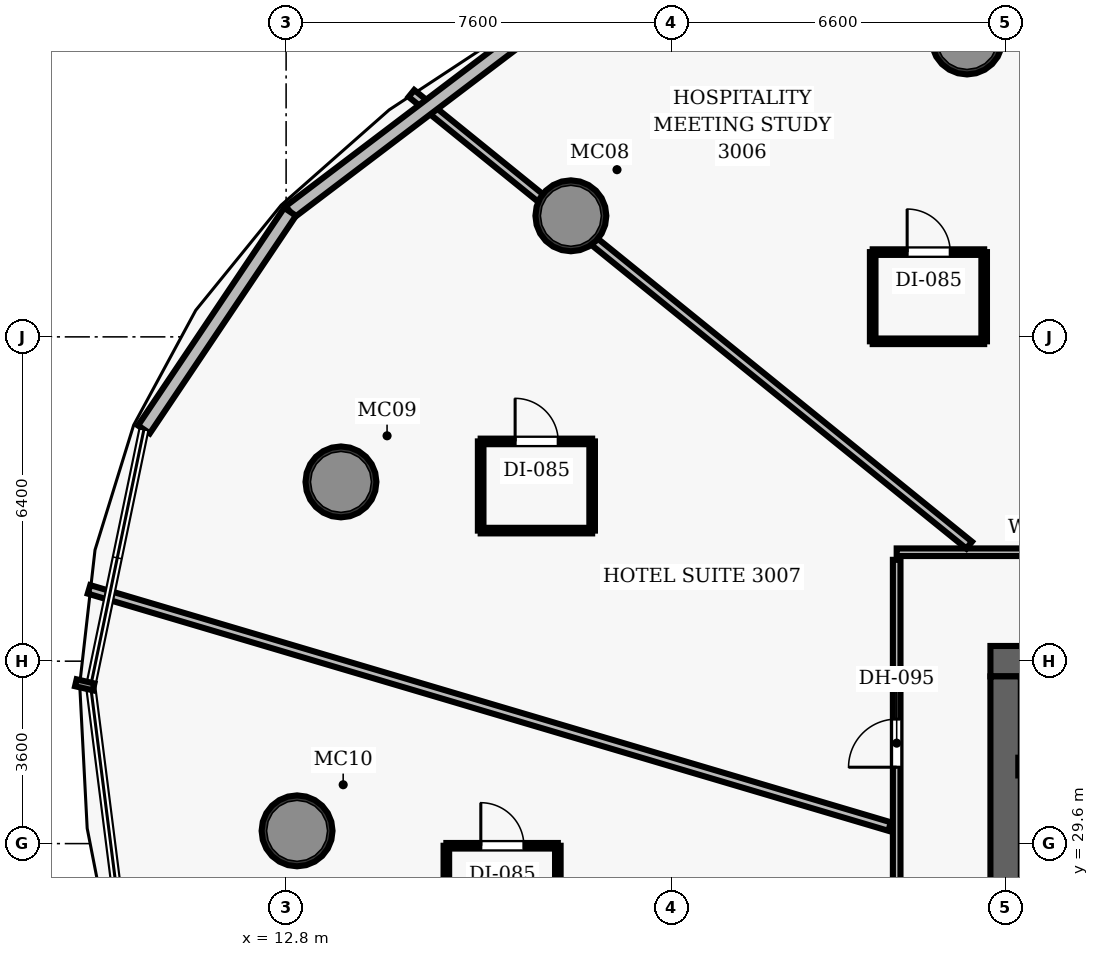
"""IFC4 building model, lengths in metres.
Left out: names, types, materials, properties, quantities, classifications, styles, units other than length and angle.
Written with IfcOpenShell. Run it as: python <this file> out.ifc"""

import sys

from ifc_helpers import new_model, si_unit, direction, frame, frame_2d, origin, origin_2d, place, context, subcontext, project, spatial, rectangle, hollow_circle, extrude, element, fill, save


model = new_model("IFC4")
c1 = context("Model", 3, precision=1e-05, world=origin(), true_north=direction((0.0, 1.0)))
c2 = subcontext(c1, "Body", "Model", "MODEL_VIEW")
j1 = project(units=[si_unit("LENGTHUNIT", "METRE"), si_unit("PLANEANGLEUNIT", "RADIAN")], contexts=[c1])
p1 = place(None, origin())
s1 = spatial("IfcSite", under=j1, at=p1, CompositionType="ELEMENT")
p2 = place(p1, origin())
s2 = spatial("IfcBuilding", under=s1, at=p2, CompositionType="ELEMENT")
p3 = place(p2, frame((0.0, 0.0, 123.8)))
s3 = spatial("IfcBuildingStorey", under=s2, at=p3, CompositionType="ELEMENT", Elevation=123.8)
p4 = place(p3, frame((26.7, 33.2, 0.0), z_axis=(0.0, 0.0, 1.0), x_axis=(1.0, 0.0, 0.0)))
e1 = element("IfcWall", 1, at=p4, inside=s3, PredefinedType="SHEAR", context=c2, shape_type="SweptSolid", body=[
    extrude(rectangle(XDim=22.6, YDim=0.6, at=frame_2d((11.3, 0.0))), origin(), (0.0, 0.0, 1.0), 3.5),
])
p5 = place(p4, frame((4.62, 0.0, 0.0)))
e2 = element("IfcOpeningElement", 2, at=p5, cuts=e1, PredefinedType="OPENING", context=c2, shape_type="SweptSolid", body=[
    extrude(rectangle(XDim=1.05, YDim=2.15, at=frame_2d((0.525, 1.075))), frame((0.0, 0.31, 0.0), z_axis=(0.0, -1.0, 0.0), x_axis=(1.0, 0.0, 0.0)), (0.0, 0.0, 1.0), 0.62),
])
p6 = place(p4, frame((14.52, 0.0, 0.0)))
e3 = element("IfcOpeningElement", 3, at=p6, cuts=e1, PredefinedType="OPENING", context=c2, shape_type="SweptSolid", body=[
    extrude(rectangle(XDim=1.05, YDim=2.15, at=frame_2d((0.525, 1.075))), frame((0.0, 0.31, 0.0), z_axis=(0.0, -1.0, 0.0), x_axis=(1.0, 0.0, 0.0)), (0.0, 0.0, 1.0), 0.62),
])
p7 = place(p3, frame((27.0, 19.1, 0.0), z_axis=(0.0, 0.0, 1.0), x_axis=(0.0, 1.0, 0.0)))
e4 = element("IfcWall", 4, at=p7, inside=s3, PredefinedType="SHEAR", context=c2, shape_type="SweptSolid", body=[
    extrude(rectangle(XDim=13.8, YDim=0.6, at=frame_2d((6.9, 0.0))), origin(), (0.0, 0.0, 1.0), 3.5),
])
p8 = place(p7, frame((8.2, 0.0, 0.0)))
e5 = element("IfcOpeningElement", 5, at=p8, cuts=e4, PredefinedType="OPENING", context=c2, shape_type="SweptSolid", body=[
    extrude(rectangle(XDim=1.05, YDim=2.15, at=frame_2d((0.525, 1.075))), frame((0.0, 0.31, 0.0), z_axis=(0.0, -1.0, 0.0), x_axis=(1.0, 0.0, 0.0)), (0.0, 0.0, 1.0), 0.62),
])
for number, where, z_axis, x_axis in (
    (6, (26.238, 45.479, 0.0), (0.0, 0.0, 1.0), (1.0, 0.0, 0.0)),
    (7, (18.42, 41.989, 0.0), (0.0, 0.0, 1.0), (1.0, 0.0, 0.0)),
    (8, (13.882, 36.738, 0.0), (0.0, 0.0, 1.0), (1.0, 0.0, 0.0)),
    (9, (13.016, 29.852, 0.0), (0.0, 0.0, 1.0), (1.0, 0.0, 0.0)),
):
    element("IfcColumn", number, at=place(p3, frame(where, z_axis=z_axis, x_axis=x_axis)), inside=s3, PredefinedType="COLUMN", context=c2, shape_type="SweptSolid", body=[
        extrude(hollow_circle(Radius=0.7, WallThickness=0.055, at=origin_2d()), origin(), (0.0, 0.0, 1.0), 3.5),
    ])
p9 = place(p3, frame((27.25, 31.12, 0.0), z_axis=(0.0, 0.0, 1.0), x_axis=(1.0, 0.0, 0.0)))
e10 = element("IfcWall", 10, at=p9, inside=s3, PredefinedType="SHEAR", context=c2, shape_type="SweptSolid", body=[
    extrude(rectangle(XDim=3.67, YDim=0.35, at=frame_2d((1.835, 0.0))), origin(), (0.0, 0.0, 1.0), 2.675),
])
p10 = place(p9, frame((1.25, 0.0, 0.0)))
e11 = element("IfcOpeningElement", 11, at=p10, cuts=e10, PredefinedType="OPENING", context=c2, shape_type="SweptSolid", body=[
    extrude(rectangle(XDim=1.1, YDim=2.15, at=frame_2d((0.55, 1.075))), frame((0.0, 0.185, 0.0), z_axis=(0.0, -1.0, 0.0), x_axis=(1.0, 0.0, 0.0)), (0.0, 0.0, 1.0), 0.37),
])
p11 = place(p3, frame((24.85, 35.35, 0.0), z_axis=(0.0, 0.0, 1.0), x_axis=(1.0, 0.0, 0.0)))
e12 = element("IfcWall", 12, at=p11, inside=s3, PredefinedType="PARTITIONING", context=c2, shape_type="SweptSolid", body=[
    extrude(rectangle(XDim=26.0, YDim=0.15, at=frame_2d((13.0, 0.0))), origin(), (0.0, 0.0, 1.0), 2.675),
])
p12 = place(p11, frame((21.964, 0.0, 0.0)))
e13 = element("IfcOpeningElement", 13, at=p12, cuts=e12, PredefinedType="OPENING", context=c2, shape_type="SweptSolid", body=[
    extrude(rectangle(XDim=0.95, YDim=2.15, at=frame_2d((0.475, 1.075))), frame((0.0, 0.085, 0.0), z_axis=(0.0, -1.0, 0.0), x_axis=(1.0, 0.0, 0.0)), (0.0, 0.0, 1.0), 0.17),
])
p13 = place(p11, frame((16.552, 0.0, 0.0)))
e14 = element("IfcOpeningElement", 14, at=p13, cuts=e12, PredefinedType="OPENING", context=c2, shape_type="SweptSolid", body=[
    extrude(rectangle(XDim=0.95, YDim=2.15, at=frame_2d((0.475, 1.075))), frame((0.0, 0.085, 0.0), z_axis=(0.0, -1.0, 0.0), x_axis=(1.0, 0.0, 0.0)), (0.0, 0.0, 1.0), 0.17),
])
p14 = place(p11, frame((12.921, 0.0, 0.0)))
e15 = element("IfcOpeningElement", 15, at=p14, cuts=e12, PredefinedType="OPENING", context=c2, shape_type="SweptSolid", body=[
    extrude(rectangle(XDim=0.95, YDim=2.15, at=frame_2d((0.475, 1.075))), frame((0.0, 0.085, 0.0), z_axis=(0.0, -1.0, 0.0), x_axis=(1.0, 0.0, 0.0)), (0.0, 0.0, 1.0), 0.17),
])
p15 = place(p11, frame((8.894, 0.0, 0.0)))
e16 = element("IfcOpeningElement", 16, at=p15, cuts=e12, PredefinedType="OPENING", context=c2, shape_type="SweptSolid", body=[
    extrude(rectangle(XDim=0.95, YDim=2.15, at=frame_2d((0.475, 1.075))), frame((0.0, 0.085, 0.0), z_axis=(0.0, -1.0, 0.0), x_axis=(1.0, 0.0, 0.0)), (0.0, 0.0, 1.0), 0.17),
])
p16 = place(p11, frame((6.027, 0.0, 0.0)))
e17 = element("IfcOpeningElement", 17, at=p16, cuts=e12, PredefinedType="OPENING", context=c2, shape_type="SweptSolid", body=[
    extrude(rectangle(XDim=0.95, YDim=2.15, at=frame_2d((0.475, 1.075))), frame((0.0, 0.085, 0.0), z_axis=(0.0, -1.0, 0.0), x_axis=(1.0, 0.0, 0.0)), (0.0, 0.0, 1.0), 0.17),
])
p17 = place(p3, frame((24.85, 27.08, 0.0), z_axis=(0.0, 0.0, 1.0), x_axis=(0.0, 1.0, 0.0)))
e18 = element("IfcWall", 18, at=p17, inside=s3, PredefinedType="PARTITIONING", context=c2, shape_type="SweptSolid", body=[
    extrude(rectangle(XDim=8.12, YDim=0.15, at=frame_2d((4.06, 0.0))), origin(), (0.0, 0.0, 1.0), 2.675),
])
p18 = place(p17, frame((4.027, 0.0, 0.0)))
e19 = element("IfcOpeningElement", 19, at=p18, cuts=e18, PredefinedType="OPENING", context=c2, shape_type="SweptSolid", body=[
    extrude(rectangle(XDim=0.95, YDim=2.15, at=frame_2d((0.475, 1.075))), frame((0.0, 0.085, 0.0), z_axis=(0.0, -1.0, 0.0), x_axis=(1.0, 0.0, 0.0)), (0.0, 0.0, 1.0), 0.17),
])
p19 = place(p3, frame((32.847, 35.49, 0.0), z_axis=(0.0, 0.0, 1.0), x_axis=(-0.477169302066, 0.878811388846, 0.0)))
e20 = element("IfcWall", 20, at=p19, inside=s3, PredefinedType="PARTITIONING", context=c2, shape_type="SweptSolid", body=[
    extrude(rectangle(XDim=15.306, YDim=0.175, at=frame_2d((7.653, 0.0))), origin(), (0.0, 0.0, 1.0), 2.675),
])
p20 = place(p3, frame((26.281, 35.49, 0.0), z_axis=(0.0, 0.0, 1.0), x_axis=(-0.777136881542, 0.629331603646, 0.0)))
e21 = element("IfcWall", 21, at=p20, inside=s3, PredefinedType="PARTITIONING", context=c2, shape_type="SweptSolid", body=[
    extrude(rectangle(XDim=14.164, YDim=0.175, at=frame_2d((7.082, 0.0))), origin(), (0.0, 0.0, 1.0), 2.675),
])
p21 = place(p3, frame((24.71, 29.937, 0.0), z_axis=(0.0, 0.0, 1.0), x_axis=(-0.958822771046, 0.284005094539, 0.0)))
e22 = element("IfcWall", 22, at=p21, inside=s3, PredefinedType="PARTITIONING", context=c2, shape_type="SweptSolid", body=[
    extrude(rectangle(XDim=16.478, YDim=0.175, at=frame_2d((8.239, 0.0))), origin(), (0.0, 0.0, 1.0), 2.675),
])
p22 = place(p3, frame((24.377, 39.513, 0.0), z_axis=(0.0, 0.0, 1.0), x_axis=(1.0, 0.0, 0.0)))
e23 = element("IfcWall", 23, at=p22, inside=s3, PredefinedType="PARTITIONING", context=c2, shape_type="SweptSolid", body=[
    extrude(rectangle(XDim=2.2, YDim=0.11, at=frame_2d((1.1, 0.0))), origin(), (0.0, 0.0, 1.0), 2.675),
])
p23 = place(p3, frame((24.377, 41.273, 0.0), z_axis=(0.0, 0.0, 1.0), x_axis=(1.0, 0.0, 0.0)))
e24 = element("IfcWall", 24, at=p23, inside=s3, PredefinedType="PARTITIONING", context=c2, shape_type="SweptSolid", body=[
    extrude(rectangle(XDim=2.2, YDim=0.11, at=frame_2d((1.1, 0.0))), origin(), (0.0, 0.0, 1.0), 2.675),
])
p24 = place(p23, frame((0.68, 0.0, 0.0)))
e25 = element("IfcOpeningElement", 25, at=p24, cuts=e24, PredefinedType="OPENING", context=c2, shape_type="SweptSolid", body=[
    extrude(rectangle(XDim=0.85, YDim=2.1, at=frame_2d((0.425, 1.05))), frame((0.0, 0.065, 0.0), z_axis=(0.0, -1.0, 0.0), x_axis=(1.0, 0.0, 0.0)), (0.0, 0.0, 1.0), 0.13),
])
for number, where, z_axis, x_axis in (
    (26, (24.377, 39.513, 0.0), (0.0, 0.0, 1.0), (0.0, 1.0, 0.0)),
    (27, (26.577, 39.513, 0.0), (0.0, 0.0, 1.0), (0.0, 1.0, 0.0)),
):
    element("IfcWall", number, at=place(p3, frame(where, z_axis=z_axis, x_axis=x_axis)), inside=s3, PredefinedType="PARTITIONING", context=c2, shape_type="SweptSolid", body=[
        extrude(rectangle(XDim=1.76, YDim=0.11, at=frame_2d((0.88, 0.0))), origin(), (0.0, 0.0, 1.0), 2.675),
    ])
p25 = place(p3, frame((16.64, 35.777, 0.0), z_axis=(0.0, 0.0, 1.0), x_axis=(1.0, 0.0, 0.0)))
e28 = element("IfcWall", 28, at=p25, inside=s3, PredefinedType="PARTITIONING", context=c2, shape_type="SweptSolid", body=[
    extrude(rectangle(XDim=2.2, YDim=0.11, at=frame_2d((1.1, 0.0))), origin(), (0.0, 0.0, 1.0), 2.675),
])
p26 = place(p3, frame((16.64, 37.537, 0.0), z_axis=(0.0, 0.0, 1.0), x_axis=(1.0, 0.0, 0.0)))
e29 = element("IfcWall", 29, at=p26, inside=s3, PredefinedType="PARTITIONING", context=c2, shape_type="SweptSolid", body=[
    extrude(rectangle(XDim=2.2, YDim=0.11, at=frame_2d((1.1, 0.0))), origin(), (0.0, 0.0, 1.0), 2.675),
])
p27 = place(p26, frame((0.68, 0.0, 0.0)))
e30 = element("IfcOpeningElement", 30, at=p27, cuts=e29, PredefinedType="OPENING", context=c2, shape_type="SweptSolid", body=[
    extrude(rectangle(XDim=0.85, YDim=2.1, at=frame_2d((0.425, 1.05))), frame((0.0, 0.065, 0.0), z_axis=(0.0, -1.0, 0.0), x_axis=(1.0, 0.0, 0.0)), (0.0, 0.0, 1.0), 0.13),
])
for number, where, z_axis, x_axis in (
    (31, (16.64, 35.777, 0.0), (0.0, 0.0, 1.0), (0.0, 1.0, 0.0)),
    (32, (18.84, 35.777, 0.0), (0.0, 0.0, 1.0), (0.0, 1.0, 0.0)),
):
    element("IfcWall", number, at=place(p3, frame(where, z_axis=z_axis, x_axis=x_axis)), inside=s3, PredefinedType="PARTITIONING", context=c2, shape_type="SweptSolid", body=[
        extrude(rectangle(XDim=1.76, YDim=0.11, at=frame_2d((0.88, 0.0))), origin(), (0.0, 0.0, 1.0), 2.675),
    ])
p28 = place(p3, frame((15.963, 29.557, 0.0), z_axis=(0.0, 0.0, 1.0), x_axis=(1.0, 0.0, 0.0)))
e33 = element("IfcWall", 33, at=p28, inside=s3, PredefinedType="PARTITIONING", context=c2, shape_type="SweptSolid", body=[
    extrude(rectangle(XDim=2.2, YDim=0.11, at=frame_2d((1.1, 0.0))), origin(), (0.0, 0.0, 1.0), 2.675),
])
p29 = place(p28, frame((0.68, 0.0, 0.0)))
e34 = element("IfcOpeningElement", 34, at=p29, cuts=e33, PredefinedType="OPENING", context=c2, shape_type="SweptSolid", body=[
    extrude(rectangle(XDim=0.85, YDim=2.1, at=frame_2d((0.425, 1.05))), frame((0.0, 0.065, 0.0), z_axis=(0.0, -1.0, 0.0), x_axis=(1.0, 0.0, 0.0)), (0.0, 0.0, 1.0), 0.13),
])
for number, where, z_axis, x_axis in (
    (35, (15.963, 27.797, 0.0), (0.0, 0.0, 1.0), (0.0, 1.0, 0.0)),
    (36, (18.163, 27.797, 0.0), (0.0, 0.0, 1.0), (0.0, 1.0, 0.0)),
):
    element("IfcWall", number, at=place(p3, frame(where, z_axis=z_axis, x_axis=x_axis)), inside=s3, PredefinedType="PARTITIONING", context=c2, shape_type="SweptSolid", body=[
        extrude(rectangle(XDim=1.76, YDim=0.11, at=frame_2d((0.88, 0.0))), origin(), (0.0, 0.0, 1.0), 2.675),
    ])
p30 = place(p3, frame((12.878, 42.069, 0.0), z_axis=(0.0, 0.0, 1.0), x_axis=(0.796971044297, 0.604017511792, 0.0)))
e37 = element("IfcWall", 37, at=p30, inside=s3, PredefinedType="SOLIDWALL", context=c2, shape_type="SweptSolid", body=[
    extrude(rectangle(XDim=5.823, YDim=0.28, at=frame_2d((2.911, 0.0))), origin(), (0.0, 0.0, 1.0), 3.26),
])
p31 = place(p3, frame((9.994, 37.773, 0.0), z_axis=(0.0, 0.0, 1.0), x_axis=(0.557419320753, 0.830231112914, 0.0)))
e38 = element("IfcWall", 38, at=p31, inside=s3, PredefinedType="SOLIDWALL", context=c2, shape_type="SweptSolid", body=[
    extrude(rectangle(XDim=5.174, YDim=0.28, at=frame_2d((2.587, 0.0))), origin(), (0.0, 0.0, 1.0), 3.26),
])
p32 = place(p24, origin())
e39 = element("IfcDoor", 39, at=p32, inside=s3, OperationType="SINGLE_SWING_LEFT", PredefinedType="DOOR", context=c2, shape_type="SweptSolid", body=[
    extrude(rectangle(XDim=0.85, YDim=2.1, at=frame_2d((0.425, 1.05))), frame((0.0, 0.025, 0.0), z_axis=(0.0, -1.0, 0.0), x_axis=(1.0, 0.0, 0.0)), (0.0, 0.0, 1.0), 0.05),
])
fill(e25, e39)
p33 = place(p18, origin())
e40 = element("IfcDoor", 40, at=p33, inside=s3, OperationType="SINGLE_SWING_LEFT", PredefinedType="DOOR", context=c2, shape_type="SweptSolid", body=[
    extrude(rectangle(XDim=0.95, YDim=2.15, at=frame_2d((0.475, 1.075))), frame((0.0, 0.025, 0.0), z_axis=(0.0, -1.0, 0.0), x_axis=(1.0, 0.0, 0.0)), (0.0, 0.0, 1.0), 0.05),
])
fill(e19, e40)
p34 = place(p27, origin())
e41 = element("IfcDoor", 41, at=p34, inside=s3, OperationType="SINGLE_SWING_LEFT", PredefinedType="DOOR", context=c2, shape_type="SweptSolid", body=[
    extrude(rectangle(XDim=0.85, YDim=2.1, at=frame_2d((0.425, 1.05))), frame((0.0, 0.025, 0.0), z_axis=(0.0, -1.0, 0.0), x_axis=(1.0, 0.0, 0.0)), (0.0, 0.0, 1.0), 0.05),
])
fill(e30, e41)
p35 = place(p29, origin())
e42 = element("IfcDoor", 42, at=p35, inside=s3, OperationType="SINGLE_SWING_LEFT", PredefinedType="DOOR", context=c2, shape_type="SweptSolid", body=[
    extrude(rectangle(XDim=0.85, YDim=2.1, at=frame_2d((0.425, 1.05))), frame((0.0, 0.025, 0.0), z_axis=(0.0, -1.0, 0.0), x_axis=(1.0, 0.0, 0.0)), (0.0, 0.0, 1.0), 0.05),
])
fill(e34, e42)
save(model, sys.argv[1])
